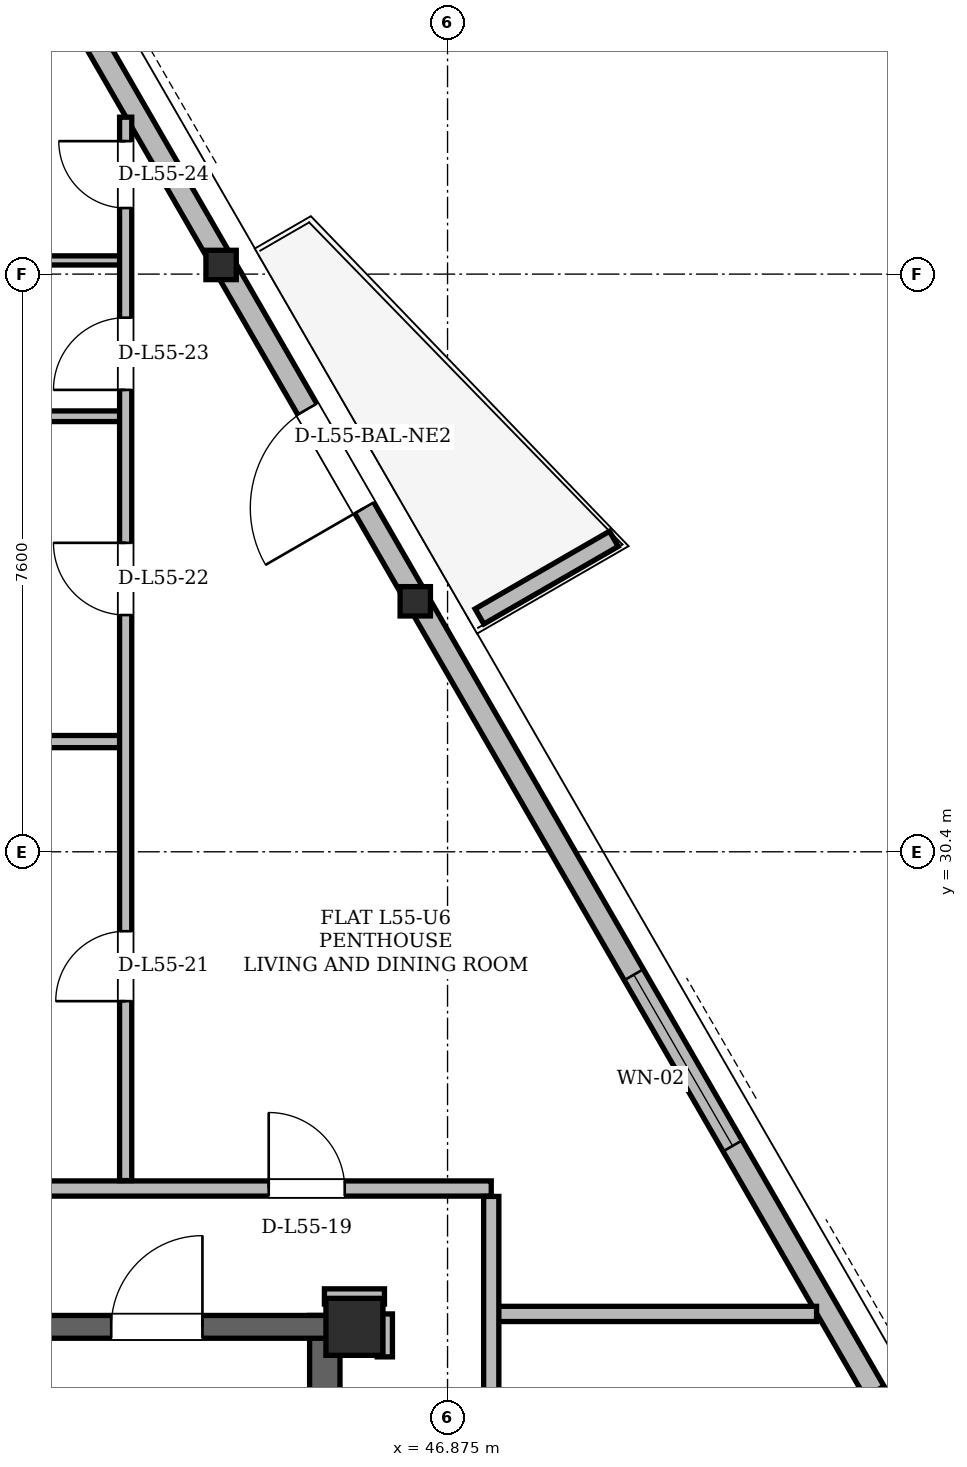
"""IFC4 building model, lengths in metres.
Left out: names, types, materials, properties, quantities, classifications, styles, units other than length and angle.
Written with IfcOpenShell. Run it as: python <this file> out.ifc"""

import sys

from ifc_helpers import new_model, si_unit, direction, frame, frame_2d, origin, origin_2d, place, context, subcontext, project, spatial, polyline, rectangle, hollow_rectangle, i_section, outline, extrude, element, fill, save


model = new_model("IFC4")
c1 = context("Model", 3, precision=1e-05, world=origin(), true_north=direction((0.0, 1.0)))
c2 = subcontext(c1, "Body", "Model", "MODEL_VIEW")
j1 = project(units=[si_unit("LENGTHUNIT", "METRE"), si_unit("PLANEANGLEUNIT", "RADIAN")], contexts=[c1])
p1 = place(None, origin())
s1 = spatial("IfcSite", under=j1, at=p1, CompositionType="ELEMENT")
p2 = place(p1, origin())
s2 = spatial("IfcBuilding", under=s1, at=p2, CompositionType="ELEMENT")
p3 = place(p2, frame((0.0, 0.0, 209.1)))
s3 = spatial("IfcBuildingStorey", under=s2, at=p3, CompositionType="ELEMENT", Elevation=209.1)
p4 = place(p3, frame((45.65, 24.15, 0.0), z_axis=(0.0, 0.0, 1.0), x_axis=(1.0, 0.0, 0.0)))
e1 = element("IfcColumn", 1, at=p4, inside=s3, PredefinedType="COLUMN", context=c2, shape_type="SweptSolid", body=[
    extrude(hollow_rectangle(XDim=0.75, YDim=0.75, WallThickness=0.06, at=origin_2d()), origin(), (0.0, 0.0, 1.0), 3.6),
])
for number, where, z_axis, x_axis in (
    (2, (46.482, 33.708, 0.004), (-0.018, -0.007, 1.0), (0.349, -0.937, 0.0)),
    (3, (43.93, 38.129, 0.004), (-0.019, -0.005, 1.0), (0.243, -0.97, 0.0)),
):
    element("IfcColumn", number, at=place(p3, frame(where, z_axis=z_axis, x_axis=x_axis)), inside=s3, PredefinedType="COLUMN", context=c2, shape_type="SweptSolid", body=[
        extrude(i_section(OverallWidth=0.399, OverallDepth=0.386, WebThickness=0.021, FlangeThickness=0.033, at=origin_2d()), origin(), (0.0, 0.0, 1.0), 3.592),
    ])
p5 = place(p3, frame((45.26, 11.0, 0.0), z_axis=(0.0, 0.0, 1.0), x_axis=(0.0, 1.0, 0.0)))
e4 = element("IfcWall", 4, at=p5, inside=s3, PredefinedType="SHEAR", context=c2, shape_type="SweptSolid", body=[
    extrude(rectangle(XDim=13.3, YDim=0.4, at=frame_2d((6.65, 0.0))), origin(), (0.0, 0.0, 1.0), 3.38),
])
p6 = place(p3, frame((29.65, 24.15, 0.0), z_axis=(0.0, 0.0, 1.0), x_axis=(1.0, 0.0, 0.0)))
e5 = element("IfcWall", 5, at=p6, inside=s3, PredefinedType="SHEAR", context=c2, shape_type="SweptSolid", body=[
    extrude(rectangle(XDim=15.7, YDim=0.3, at=frame_2d((7.85, 0.0))), origin(), (0.0, 0.0, 1.0), 3.38),
])
p7 = place(p6, frame((1.7, 0.0, 0.0)))
e6 = element("IfcOpeningElement", 6, at=p7, cuts=e5, PredefinedType="OPENING", context=c2, shape_type="SweptSolid", body=[
    extrude(rectangle(XDim=1.2, YDim=2.2, at=frame_2d((0.6, 1.1))), frame((0.0, 0.15, 0.0), z_axis=(0.0, -1.0, 0.0), x_axis=(1.0, 0.0, 0.0)), (0.0, 0.0, 1.0), 0.3),
])
p8 = place(p6, frame((12.8, 0.0, 0.0)))
e7 = element("IfcOpeningElement", 7, at=p8, cuts=e5, PredefinedType="OPENING", context=c2, shape_type="SweptSolid", body=[
    extrude(rectangle(XDim=1.2, YDim=2.2, at=frame_2d((0.6, 1.1))), frame((0.0, 0.15, 0.0), z_axis=(0.0, -1.0, 0.0), x_axis=(1.0, 0.0, 0.0)), (0.0, 0.0, 1.0), 0.3),
])
p9 = place(p6, frame((7.4, 0.0, 0.0)))
e8 = element("IfcOpeningElement", 8, at=p9, cuts=e5, PredefinedType="OPENING", context=c2, shape_type="SweptSolid", body=[
    extrude(rectangle(XDim=0.9, YDim=2.05, at=frame_2d((0.45, 1.025))), frame((0.0, 0.15, 0.0), z_axis=(0.0, -1.0, 0.0), x_axis=(1.0, 0.0, 0.0)), (0.0, 0.0, 1.0), 0.3),
])
p10 = place(p3, frame((59.246, 11.601, 0.0), z_axis=(0.0, 0.0, 1.0), x_axis=(-0.50000139879, 0.866024596191, 0.0)))
e9 = element("IfcWall", 9, at=p10, inside=s3, PredefinedType="SOLIDWALL", context=c2, shape_type="SweptSolid", body=[
    extrude(rectangle(XDim=36.467, YDim=0.29, at=frame_2d((18.233, 0.0))), origin(), (0.0, 0.0, 1.0), 2.677),
])
p11 = place(p10, frame((6.789, 0.0, 0.0)))
e10 = element("IfcOpeningElement", 10, at=p11, cuts=e9, PredefinedType="OPENING", context=c2, shape_type="SweptSolid", body=[
    extrude(rectangle(XDim=1.5, YDim=2.2, at=frame_2d((0.75, 1.1))), frame((0.0, 0.145, 0.0), z_axis=(0.0, -1.0, 0.0), x_axis=(1.0, 0.0, 0.0)), (0.0, 0.0, 1.0), 0.29),
])
p12 = place(p10, frame((26.932, 0.0, 0.0)))
e11 = element("IfcOpeningElement", 11, at=p12, cuts=e9, PredefinedType="OPENING", context=c2, shape_type="SweptSolid", body=[
    extrude(rectangle(XDim=1.5, YDim=2.2, at=frame_2d((0.75, 1.1))), frame((0.0, 0.145, 0.0), z_axis=(0.0, -1.0, 0.0), x_axis=(1.0, 0.0, 0.0)), (0.0, 0.0, 1.0), 0.29),
])
p13 = place(p10, frame((12.324, 0.0, 0.85)))
e12 = element("IfcOpeningElement", 12, at=p13, cuts=e9, PredefinedType="OPENING", context=c2, shape_type="SweptSolid", body=[
    extrude(rectangle(XDim=1.2, YDim=1.48, at=frame_2d((0.6, 0.74))), frame((0.0, 0.145, 0.0), z_axis=(0.0, -1.0, 0.0), x_axis=(1.0, 0.0, 0.0)), (0.0, 0.0, 1.0), 0.29),
])
p14 = place(p10, frame((2.218, 0.0, 0.85)))
e13 = element("IfcOpeningElement", 13, at=p14, cuts=e9, PredefinedType="OPENING", context=c2, shape_type="SweptSolid", body=[
    extrude(rectangle(XDim=1.2, YDim=1.48, at=frame_2d((0.6, 0.74))), frame((0.0, 0.145, 0.0), z_axis=(0.0, -1.0, 0.0), x_axis=(1.0, 0.0, 0.0)), (0.0, 0.0, 1.0), 0.29),
])
p15 = place(p10, frame((17.24, 0.0, 0.85)))
e14 = element("IfcOpeningElement", 14, at=p15, cuts=e9, PredefinedType="OPENING", context=c2, shape_type="SweptSolid", body=[
    extrude(rectangle(XDim=2.6, YDim=1.717, at=frame_2d((1.3, 0.858))), frame((0.0, 0.145, 0.0), z_axis=(0.0, -1.0, 0.0), x_axis=(1.0, 0.0, 0.0)), (0.0, 0.0, 1.0), 0.29),
])
p16 = place(p10, frame((34.098, 0.0, 0.85)))
e15 = element("IfcOpeningElement", 15, at=p16, cuts=e9, PredefinedType="OPENING", context=c2, shape_type="SweptSolid", body=[
    extrude(rectangle(XDim=1.2, YDim=1.48, at=frame_2d((0.6, 0.74))), frame((0.0, 0.145, 0.0), z_axis=(0.0, -1.0, 0.0), x_axis=(1.0, 0.0, 0.0)), (0.0, 0.0, 1.0), 0.29),
])
p17 = place(p3, frame((47.295, 33.496, 0.0), z_axis=(0.0, 0.0, 1.0), x_axis=(0.866012356593, 0.500022597718, 0.0)))
e16 = element("IfcWall", 16, at=p17, inside=s3, PredefinedType="PARAPET", context=c2, shape_type="SweptSolid", body=[
    extrude(outline(polyline([(0.0, 0.0), (2.042, 0.0), (2.042, 1.1), (0.0, 1.32), (0.0, 0.0)])), frame((0.0, 0.115, 0.0), z_axis=(0.0, -1.0, 0.0), x_axis=(1.0, 0.0, 0.0)), (0.0, 0.0, 1.0), 0.23),
])
p18 = place(p3, frame((47.45, 24.32, 0.0), z_axis=(0.0, 0.0, 1.0), x_axis=(1.0, 0.0, 0.0)))
e17 = element("IfcWall", 17, at=p18, inside=s3, PredefinedType="PARTITIONING", context=c2, shape_type="SweptSolid", body=[
    extrude(rectangle(XDim=4.28, YDim=0.2, at=frame_2d((2.14, 0.0))), origin(), (0.0, 0.0, 1.0), 3.38),
])
p19 = place(p3, frame((45.255, 24.55, 0.0), z_axis=(0.0, 0.0, 1.0), x_axis=(1.0, 0.0, 0.0)))
e18 = element("IfcWall", 18, at=p19, inside=s3, PredefinedType="PARTITIONING", context=c2, shape_type="SweptSolid", body=[
    extrude(rectangle(XDim=0.79, YDim=0.2, at=frame_2d((0.395, 0.0))), origin(), (0.0, 0.0, 1.0), 2.913),
])
p20 = place(p3, frame((25.6, 25.97, 0.0), z_axis=(0.0, 0.0, 1.0), x_axis=(1.0, 0.0, 0.0)))
e19 = element("IfcWall", 19, at=p20, inside=s3, PredefinedType="PARTITIONING", context=c2, shape_type="SweptSolid", body=[
    extrude(rectangle(XDim=21.85, YDim=0.2, at=frame_2d((10.925, 0.0))), origin(), (0.0, 0.0, 1.0), 2.913),
])
p21 = place(p20, frame((9.75, 0.0, 0.0)))
e20 = element("IfcOpeningElement", 20, at=p21, cuts=e19, PredefinedType="OPENING", context=c2, shape_type="SweptSolid", body=[
    extrude(rectangle(XDim=1.3, YDim=2.2, at=frame_2d((0.65, 1.1))), frame((0.0, 0.1, 0.0), z_axis=(0.0, -1.0, 0.0), x_axis=(1.0, 0.0, 0.0)), (0.0, 0.0, 1.0), 0.2),
])
p22 = place(p20, frame((18.922, 0.0, 0.0)))
e21 = element("IfcOpeningElement", 21, at=p22, cuts=e19, PredefinedType="OPENING", context=c2, shape_type="SweptSolid", body=[
    extrude(rectangle(XDim=1.0, YDim=2.18, at=frame_2d((0.5, 1.09))), frame((0.0, 0.1, 0.0), z_axis=(0.0, -1.0, 0.0), x_axis=(1.0, 0.0, 0.0)), (0.0, 0.0, 1.0), 0.2),
])
p23 = place(p3, frame((39.05, 31.85, 0.0), z_axis=(0.0, 0.0, 1.0), x_axis=(1.0, 0.0, 0.0)))
e22 = element("IfcWall", 22, at=p23, inside=s3, PredefinedType="PARTITIONING", context=c2, shape_type="SweptSolid", body=[
    extrude(rectangle(XDim=3.586, YDim=0.16, at=frame_2d((1.793, 0.0))), origin(), (0.0, 0.0, 1.0), 3.38),
])
p24 = place(p3, frame((39.05, 36.13, 0.0), z_axis=(0.0, 0.0, 1.0), x_axis=(1.0, 0.0, 0.0)))
e23 = element("IfcWall", 23, at=p24, inside=s3, PredefinedType="PARTITIONING", context=c2, shape_type="SweptSolid", body=[
    extrude(rectangle(XDim=3.586, YDim=0.14, at=frame_2d((1.793, 0.0))), origin(), (0.0, 0.0, 1.0), 3.38),
])
p25 = place(p3, frame((39.05, 38.18, 0.0), z_axis=(0.0, 0.0, 1.0), x_axis=(1.0, 0.0, 0.0)))
e24 = element("IfcWall", 24, at=p25, inside=s3, PredefinedType="PARTITIONING", context=c2, shape_type="SweptSolid", body=[
    extrude(rectangle(XDim=3.586, YDim=0.12, at=frame_2d((1.793, 0.0))), origin(), (0.0, 0.0, 1.0), 2.913),
])
p26 = place(p3, frame((42.64, 26.074, 0.0), z_axis=(0.0, 0.0, 1.0), x_axis=(0.0, 1.0, 0.0)))
e25 = element("IfcWall", 25, at=p26, inside=s3, PredefinedType="PARTITIONING", context=c2, shape_type="SweptSolid", body=[
    extrude(rectangle(XDim=13.991, YDim=0.16, at=frame_2d((6.995, 0.0))), origin(), (0.0, 0.0, 1.0), 2.913),
])
p27 = place(p26, frame((2.361, 0.0, 0.0)))
e26 = element("IfcOpeningElement", 26, at=p27, cuts=e25, PredefinedType="OPENING", context=c2, shape_type="SweptSolid", body=[
    extrude(rectangle(XDim=0.92, YDim=2.12, at=frame_2d((0.46, 1.06))), frame((0.0, 0.08, 0.0), z_axis=(0.0, -1.0, 0.0), x_axis=(1.0, 0.0, 0.0)), (0.0, 0.0, 1.0), 0.16),
])
p28 = place(p26, frame((7.441, 0.0, 0.0)))
e27 = element("IfcOpeningElement", 27, at=p28, cuts=e25, PredefinedType="OPENING", context=c2, shape_type="SweptSolid", body=[
    extrude(rectangle(XDim=0.95, YDim=2.1, at=frame_2d((0.475, 1.05))), frame((0.0, 0.08, 0.0), z_axis=(0.0, -1.0, 0.0), x_axis=(1.0, 0.0, 0.0)), (0.0, 0.0, 1.0), 0.16),
])
p29 = place(p26, frame((10.403, 0.0, 0.0)))
e28 = element("IfcOpeningElement", 28, at=p29, cuts=e25, PredefinedType="OPENING", context=c2, shape_type="SweptSolid", body=[
    extrude(rectangle(XDim=0.95, YDim=2.1, at=frame_2d((0.475, 1.05))), frame((0.0, 0.08, 0.0), z_axis=(0.0, -1.0, 0.0), x_axis=(1.0, 0.0, 0.0)), (0.0, 0.0, 1.0), 0.16),
])
p30 = place(p26, frame((12.795, 0.0, 0.0)))
e29 = element("IfcOpeningElement", 29, at=p30, cuts=e25, PredefinedType="OPENING", context=c2, shape_type="SweptSolid", body=[
    extrude(rectangle(XDim=0.88, YDim=2.08, at=frame_2d((0.44, 1.04))), frame((0.0, 0.08, 0.0), z_axis=(0.0, -1.0, 0.0), x_axis=(1.0, 0.0, 0.0)), (0.0, 0.0, 1.0), 0.16),
])
p31 = place(p3, frame((46.05, 23.755, 0.0), z_axis=(0.0, 0.0, 1.0), x_axis=(0.0, 1.0, 0.0)))
e30 = element("IfcWall", 30, at=p31, inside=s3, PredefinedType="PARTITIONING", context=c2, shape_type="SweptSolid", body=[
    extrude(rectangle(XDim=0.565, YDim=0.2, at=frame_2d((0.283, 0.0))), origin(), (0.0, 0.0, 1.0), 3.38),
])
p32 = place(p3, frame((47.45, 9.404, 0.0), z_axis=(0.0, 0.0, 1.0), x_axis=(0.0, 1.0, 0.0)))
e31 = element("IfcWall", 31, at=p32, inside=s3, PredefinedType="PARTITIONING", context=c2, shape_type="SweptSolid", body=[
    extrude(rectangle(XDim=16.462, YDim=0.2, at=frame_2d((8.231, 0.0))), origin(), (0.0, 0.0, 1.0), 2.913),
])
p33 = place(p32, frame((9.496, 0.0, 0.0)))
e32 = element("IfcOpeningElement", 32, at=p33, cuts=e31, PredefinedType="OPENING", context=c2, shape_type="SweptSolid", body=[
    extrude(rectangle(XDim=1.0, YDim=2.18, at=frame_2d((0.5, 1.09))), frame((0.0, 0.1, 0.0), z_axis=(0.0, -1.0, 0.0), x_axis=(1.0, 0.0, 0.0)), (0.0, 0.0, 1.0), 0.2),
])
p34 = place(p12, origin())
e33 = element("IfcDoor", 33, at=p34, inside=s3, OperationType="SINGLE_SWING_LEFT", PredefinedType="DOOR", context=c2, shape_type="SweptSolid", body=[
    extrude(rectangle(XDim=1.5, YDim=2.2, at=frame_2d((0.75, 1.1))), frame((0.0, 0.025, 0.0), z_axis=(0.0, -1.0, 0.0), x_axis=(1.0, 0.0, 0.0)), (0.0, 0.0, 1.0), 0.05),
])
fill(e11, e33)
p35 = place(p15, origin())
e34 = element("IfcWindow", 34, at=p35, inside=s3, PartitioningType="SINGLE_PANEL", PredefinedType="WINDOW", context=c2, shape_type="SweptSolid", body=[
    extrude(rectangle(XDim=2.6, YDim=1.717, at=frame_2d((1.3, 0.858))), frame((0.0, 0.03, 0.0), z_axis=(0.0, -1.0, 0.0), x_axis=(1.0, 0.0, 0.0)), (0.0, 0.0, 1.0), 0.06),
])
fill(e14, e34)
p36 = place(p8, origin())
e35 = element("IfcDoor", 35, at=p36, inside=s3, OperationType="SINGLE_SWING_RIGHT", PredefinedType="DOOR", context=c2, shape_type="SweptSolid", body=[
    extrude(rectangle(XDim=1.2, YDim=2.2, at=frame_2d((0.6, 1.1))), frame((0.0, 0.025, 0.0), z_axis=(0.0, -1.0, 0.0), x_axis=(1.0, 0.0, 0.0)), (0.0, 0.0, 1.0), 0.05),
])
fill(e7, e35)
p37 = place(p22, origin())
e36 = element("IfcDoor", 36, at=p37, inside=s3, OperationType="SINGLE_SWING_LEFT", PredefinedType="DOOR", context=c2, shape_type="SweptSolid", body=[
    extrude(rectangle(XDim=1.0, YDim=2.18, at=frame_2d((0.5, 1.09))), frame((0.0, 0.025, 0.0), z_axis=(0.0, -1.0, 0.0), x_axis=(1.0, 0.0, 0.0)), (0.0, 0.0, 1.0), 0.05),
])
fill(e21, e36)
p38 = place(p27, origin())
e37 = element("IfcDoor", 37, at=p38, inside=s3, OperationType="SINGLE_SWING_LEFT", PredefinedType="DOOR", context=c2, shape_type="SweptSolid", body=[
    extrude(rectangle(XDim=0.92, YDim=2.12, at=frame_2d((0.46, 1.06))), frame((0.0, 0.025, 0.0), z_axis=(0.0, -1.0, 0.0), x_axis=(1.0, 0.0, 0.0)), (0.0, 0.0, 1.0), 0.05),
])
fill(e26, e37)
p39 = place(p28, origin())
e38 = element("IfcDoor", 38, at=p39, inside=s3, OperationType="SINGLE_SWING_RIGHT", PredefinedType="DOOR", context=c2, shape_type="SweptSolid", body=[
    extrude(rectangle(XDim=0.95, YDim=2.1, at=frame_2d((0.475, 1.05))), frame((0.0, 0.025, 0.0), z_axis=(0.0, -1.0, 0.0), x_axis=(1.0, 0.0, 0.0)), (0.0, 0.0, 1.0), 0.05),
])
fill(e27, e38)
p40 = place(p29, origin())
e39 = element("IfcDoor", 39, at=p40, inside=s3, OperationType="SINGLE_SWING_LEFT", PredefinedType="DOOR", context=c2, shape_type="SweptSolid", body=[
    extrude(rectangle(XDim=0.95, YDim=2.1, at=frame_2d((0.475, 1.05))), frame((0.0, 0.025, 0.0), z_axis=(0.0, -1.0, 0.0), x_axis=(1.0, 0.0, 0.0)), (0.0, 0.0, 1.0), 0.05),
])
fill(e28, e39)
p41 = place(p30, origin())
e40 = element("IfcDoor", 40, at=p41, inside=s3, OperationType="SINGLE_SWING_RIGHT", PredefinedType="DOOR", context=c2, shape_type="SweptSolid", body=[
    extrude(rectangle(XDim=0.88, YDim=2.08, at=frame_2d((0.44, 1.04))), frame((0.0, 0.025, 0.0), z_axis=(0.0, -1.0, 0.0), x_axis=(1.0, 0.0, 0.0)), (0.0, 0.0, 1.0), 0.05),
])
fill(e29, e40)
save(model, sys.argv[1])
